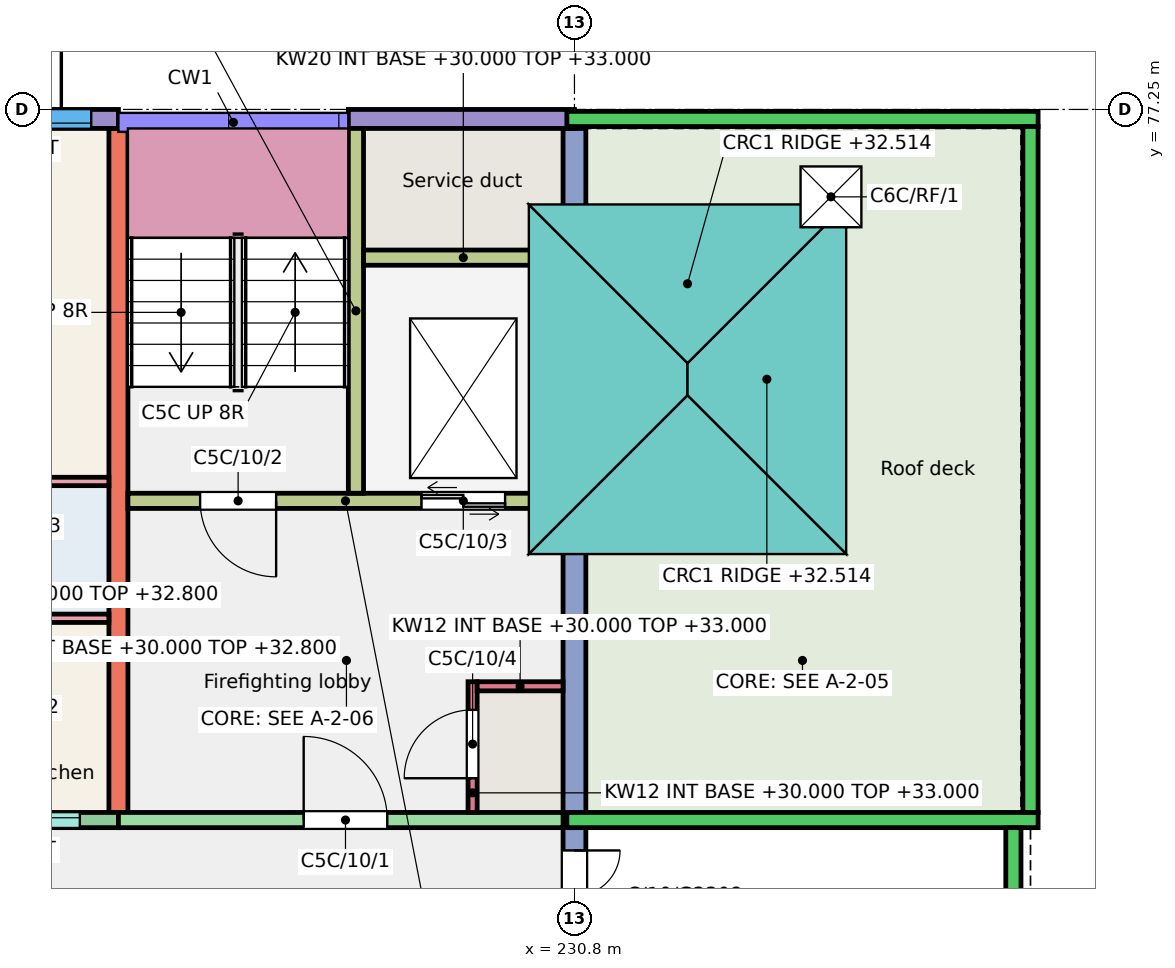
"""IFC4 building model, lengths in metres.
Left out: names, types, materials, properties, quantities, classifications, styles, units other than length and angle.
Written with IfcOpenShell. Run it as: python <this file> out.ifc"""

import sys

from ifc_helpers import new_model, si_unit, direction, frame, frame_2d, origin, origin_2d, place, context, subcontext, project, spatial, rectangle, extrude, element, fill, save


model = new_model("IFC4")
c1 = context("Model", 3, precision=1e-05, world=origin(), true_north=direction((0.0, 1.0)))
c2 = subcontext(c1, "Body", "Model", "MODEL_VIEW")
j1 = project(units=[si_unit("LENGTHUNIT", "METRE"), si_unit("PLANEANGLEUNIT", "RADIAN")], contexts=[c1])
p1 = place(None, origin())
s1 = spatial("IfcSite", under=j1, at=p1, CompositionType="ELEMENT")
p2 = place(p1, origin())
s2 = spatial("IfcBuilding", under=s1, at=p2, CompositionType="ELEMENT")
p3 = place(p2, frame((0.0, 0.0, 30.0)))
s3 = spatial("IfcBuildingStorey", under=s2, at=p3, CompositionType="ELEMENT", Elevation=30.0)
p4 = place(p3, frame((224.8, 68.0, 0.0), z_axis=(0.0, 0.0, 1.0), x_axis=(0.0, 1.0, 0.0)))
e1 = element("IfcWall", 1, at=p4, inside=s3, PredefinedType="SHEAR", context=c2, shape_type="SweptSolid", body=[
    extrude(rectangle(XDim=9.0, YDim=0.25, at=frame_2d((4.5, 0.0))), origin(), (0.0, 0.0, 1.0), 3.0),
])
p5 = place(p3, frame((230.8, 66.0, 0.0), z_axis=(0.0, 0.0, 1.0), x_axis=(0.0, 1.0, 0.0)))
e2 = element("IfcWall", 2, at=p5, inside=s3, PredefinedType="SHEAR", context=c2, shape_type="SweptSolid", body=[
    extrude(rectangle(XDim=11.0, YDim=0.3, at=frame_2d((5.5, 0.0))), origin(), (0.0, 0.0, 1.0), 3.0),
])
p6 = place(p5, frame((0.3, 0.0, 0.0)))
e3 = element("IfcOpeningElement", 3, at=p6, cuts=e2, PredefinedType="OPENING", context=c2, shape_type="SweptSolid", body=[
    extrude(rectangle(XDim=1.2, YDim=2.1, at=frame_2d((0.6, 1.05))), frame((0.0, 0.16, 0.0), z_axis=(0.0, -1.0, 0.0), x_axis=(1.0, 0.0, 0.0)), (0.0, 0.0, 1.0), 0.32),
])
p7 = place(p3, frame((221.2, 77.125, 0.0), z_axis=(0.0, 0.0, 1.0), x_axis=(1.0, 0.0, 0.0)))
e4 = element("IfcWall", 4, at=p7, inside=s3, PredefinedType="SOLIDWALL", context=c2, shape_type="SweptSolid", body=[
    extrude(rectangle(XDim=3.6, YDim=0.25, at=frame_2d((1.8, 0.0))), origin(), (0.0, 0.0, 1.0), 3.0),
])
p8 = place(p7, frame((1.742, 0.0, 0.9)))
e5 = element("IfcOpeningElement", 5, at=p8, cuts=e4, PredefinedType="OPENING", context=c2, shape_type="SweptSolid", body=[
    extrude(rectangle(XDim=1.5, YDim=1.5, at=frame_2d((0.75, 0.75))), frame((0.0, 0.135, 0.0), z_axis=(0.0, -1.0, 0.0), x_axis=(1.0, 0.0, 0.0)), (0.0, 0.0, 1.0), 0.27),
])
p9 = place(p7, frame((0.409, 0.0, 0.0)))
e6 = element("IfcOpeningElement", 6, at=p9, cuts=e4, PredefinedType="OPENING", context=c2, shape_type="SweptSolid", body=[
    extrude(rectangle(XDim=1.0, YDim=2.1, at=frame_2d((0.5, 1.05))), frame((0.0, 0.135, 0.0), z_axis=(0.0, -1.0, 0.0), x_axis=(1.0, 0.0, 0.0)), (0.0, 0.0, 1.0), 0.27),
])
p10 = place(p3, frame((221.2, 67.9, 0.0), z_axis=(0.0, 0.0, 1.0), x_axis=(1.0, 0.0, 0.0)))
e7 = element("IfcWall", 7, at=p10, inside=s3, PredefinedType="SOLIDWALL", context=c2, shape_type="SweptSolid", body=[
    extrude(rectangle(XDim=3.6, YDim=0.2, at=frame_2d((1.8, 0.0))), origin(), (0.0, 0.0, 1.0), 3.0),
])
p11 = place(p10, frame((1.893, 0.0, 1.1)))
e8 = element("IfcOpeningElement", 8, at=p11, cuts=e7, PredefinedType="OPENING", context=c2, shape_type="SweptSolid", body=[
    extrude(rectangle(XDim=1.2, YDim=1.3, at=frame_2d((0.6, 0.65))), frame((0.0, 0.11, 0.0), z_axis=(0.0, -1.0, 0.0), x_axis=(1.0, 0.0, 0.0)), (0.0, 0.0, 1.0), 0.22),
])
p12 = place(p10, frame((0.25, 0.0, 0.0)))
e9 = element("IfcOpeningElement", 9, at=p12, cuts=e7, PredefinedType="OPENING", context=c2, shape_type="SweptSolid", body=[
    extrude(rectangle(XDim=1.0, YDim=2.1, at=frame_2d((0.5, 1.05))), frame((0.0, 0.11, 0.0), z_axis=(0.0, -1.0, 0.0), x_axis=(1.0, 0.0, 0.0)), (0.0, 0.0, 1.0), 0.22),
])
p13 = place(p3, frame((227.825, 77.125, 0.0), z_axis=(0.0, 0.0, 1.0), x_axis=(1.0, 0.0, 0.0)))
e10 = element("IfcWall", 10, at=p13, inside=s3, PredefinedType="SOLIDWALL", context=c2, shape_type="SweptSolid", body=[
    extrude(rectangle(XDim=2.975, YDim=0.25, at=frame_2d((1.488, 0.0))), origin(), (0.0, 0.0, 1.0), 3.0),
])
p14 = place(p3, frame((224.8, 67.9, 0.0), z_axis=(0.0, 0.0, 1.0), x_axis=(1.0, 0.0, 0.0)))
e11 = element("IfcWall", 11, at=p14, inside=s3, PredefinedType="SHEAR", context=c2, shape_type="SweptSolid", body=[
    extrude(rectangle(XDim=5.85, YDim=0.2, at=frame_2d((2.925, 0.0))), origin(), (0.0, 0.0, 1.0), 3.0),
])
p15 = place(p14, frame((2.438, 0.0, 0.0)))
e12 = element("IfcOpeningElement", 12, at=p15, cuts=e11, PredefinedType="OPENING", context=c2, shape_type="SweptSolid", body=[
    extrude(rectangle(XDim=1.1, YDim=2.1, at=frame_2d((0.55, 1.05))), frame((0.0, 0.11, 0.0), z_axis=(0.0, -1.0, 0.0), x_axis=(1.0, 0.0, 0.0)), (0.0, 0.0, 1.0), 0.22),
])
p16 = place(p3, frame((224.925, 72.1, 0.0), z_axis=(0.0, 0.0, 1.0), x_axis=(1.0, 0.0, 0.0)))
e13 = element("IfcWall", 13, at=p16, inside=s3, PredefinedType="SHEAR", context=c2, shape_type="SweptSolid", body=[
    extrude(rectangle(XDim=5.725, YDim=0.2, at=frame_2d((2.862, 0.0))), origin(), (0.0, 0.0, 1.0), 3.0),
])
p17 = place(p16, frame((0.95, 0.0, 0.0)))
e14 = element("IfcOpeningElement", 14, at=p17, cuts=e13, PredefinedType="OPENING", context=c2, shape_type="SweptSolid", body=[
    extrude(rectangle(XDim=1.0, YDim=2.1, at=frame_2d((0.5, 1.05))), frame((0.0, 0.11, 0.0), z_axis=(0.0, -1.0, 0.0), x_axis=(1.0, 0.0, 0.0)), (0.0, 0.0, 1.0), 0.22),
])
p18 = place(p16, frame((3.863, 0.0, 0.0)))
e15 = element("IfcOpeningElement", 15, at=p18, cuts=e13, PredefinedType="OPENING", context=c2, shape_type="SweptSolid", body=[
    extrude(rectangle(XDim=1.1, YDim=2.1, at=frame_2d((0.55, 1.05))), frame((0.0, 0.11, 0.0), z_axis=(0.0, -1.0, 0.0), x_axis=(1.0, 0.0, 0.0)), (0.0, 0.0, 1.0), 0.22),
])
p19 = place(p3, frame((227.925, 72.2, 0.0), z_axis=(0.0, 0.0, 1.0), x_axis=(0.0, 1.0, 0.0)))
e16 = element("IfcWall", 16, at=p19, inside=s3, PredefinedType="SHEAR", context=c2, shape_type="SweptSolid", body=[
    extrude(rectangle(XDim=4.8, YDim=0.2, at=frame_2d((2.4, 0.0))), origin(), (0.0, 0.0, 1.0), 3.0),
])
p20 = place(p3, frame((228.025, 75.3, 0.0), z_axis=(0.0, 0.0, 1.0), x_axis=(1.0, 0.0, 0.0)))
e17 = element("IfcWall", 17, at=p20, inside=s3, PredefinedType="SHEAR", context=c2, shape_type="SweptSolid", body=[
    extrude(rectangle(XDim=2.625, YDim=0.2, at=frame_2d((1.312, 0.0))), origin(), (0.0, 0.0, 1.0), 3.0),
])
p21 = place(p3, frame((229.46, 68.0, 0.0), z_axis=(0.0, 0.0, 1.0), x_axis=(0.0, 1.0, 0.0)))
e18 = element("IfcWall", 18, at=p21, inside=s3, PredefinedType="SHEAR", context=c2, shape_type="SweptSolid", body=[
    extrude(rectangle(XDim=1.72, YDim=0.12, at=frame_2d((0.86, 0.0))), origin(), (0.0, 0.0, 1.0), 3.0),
])
p22 = place(p21, frame((0.45, 0.0, 0.0)))
e19 = element("IfcOpeningElement", 19, at=p22, cuts=e18, PredefinedType="OPENING", context=c2, shape_type="SweptSolid", body=[
    extrude(rectangle(XDim=0.9, YDim=2.1, at=frame_2d((0.45, 1.05))), frame((0.0, 0.07, 0.0), z_axis=(0.0, -1.0, 0.0), x_axis=(1.0, 0.0, 0.0)), (0.0, 0.0, 1.0), 0.14),
])
p23 = place(p3, frame((229.52, 69.66, 0.0), z_axis=(0.0, 0.0, 1.0), x_axis=(1.0, 0.0, 0.0)))
e20 = element("IfcWall", 20, at=p23, inside=s3, PredefinedType="SHEAR", context=c2, shape_type="SweptSolid", body=[
    extrude(rectangle(XDim=1.13, YDim=0.12, at=frame_2d((0.565, 0.0))), origin(), (0.0, 0.0, 1.0), 3.0),
])
for number, where, z_axis, x_axis in (
    (21, (230.95, 72.1, 0.0), (0.0, 0.0, 1.0), (1.0, 0.0, 0.0)),
    (22, (230.95, 75.3, 0.0), (0.0, 0.0, 1.0), (1.0, 0.0, 0.0)),
):
    element("IfcWall", number, at=place(p3, frame(where, z_axis=z_axis, x_axis=x_axis)), inside=s3, PredefinedType="SHEAR", context=c2, shape_type="SweptSolid", body=[
        extrude(rectangle(XDim=2.825, YDim=0.2, at=frame_2d((1.413, 0.0))), origin(), (0.0, 0.0, 1.0), 1.5),
    ])
p24 = place(p3, frame((233.675, 72.2, 0.0), z_axis=(0.0, 0.0, 1.0), x_axis=(0.0, 1.0, 0.0)))
e23 = element("IfcWall", 23, at=p24, inside=s3, PredefinedType="SHEAR", context=c2, shape_type="SweptSolid", body=[
    extrude(rectangle(XDim=3.0, YDim=0.2, at=frame_2d((1.5, 0.0))), origin(), (0.0, 0.0, 1.0), 1.5),
])
for number, where, z_axis, x_axis in (
    (24, (230.7, 77.125, 0.0), (0.0, 0.0, 1.0), (1.0, 0.0, 0.0)),
    (25, (230.7, 67.9, 0.0), (0.0, 0.0, 1.0), (1.0, 0.0, 0.0)),
):
    element("IfcWall", number, at=place(p3, frame(where, z_axis=z_axis, x_axis=x_axis)), inside=s3, PredefinedType="PARAPET", context=c2, shape_type="SweptSolid", body=[
        extrude(rectangle(XDim=6.2, YDim=0.2, at=frame_2d((3.1, 0.0))), origin(), (0.0, 0.0, 1.0), 1.1),
    ])
p25 = place(p3, frame((236.8, 68.0, 0.0), z_axis=(0.0, 0.0, 1.0), x_axis=(0.0, 1.0, 0.0)))
e26 = element("IfcWall", 26, at=p25, inside=s3, PredefinedType="PARAPET", context=c2, shape_type="SweptSolid", body=[
    extrude(rectangle(XDim=9.025, YDim=0.2, at=frame_2d((4.512, 0.0))), origin(), (0.0, 0.0, 1.0), 1.1),
])
p26 = place(p3, frame((236.575, 66.225, 0.0), z_axis=(0.0, 0.0, 1.0), x_axis=(0.0, 1.0, 0.0)))
e27 = element("IfcWall", 27, at=p26, inside=s3, PredefinedType="PARAPET", context=c2, shape_type="SweptSolid", body=[
    extrude(rectangle(XDim=1.575, YDim=0.2, at=frame_2d((0.788, 0.0))), origin(), (0.0, 0.0, 1.0), 1.1),
])
p27 = place(p3, frame((222.71, 70.555, 0.0), z_axis=(0.0, 0.0, 1.0), x_axis=(1.0, 0.0, 0.0)))
e28 = element("IfcWall", 28, at=p27, inside=s3, PredefinedType="PARTITIONING", context=c2, shape_type="SweptSolid", body=[
    extrude(rectangle(XDim=1.965, YDim=0.11, at=frame_2d((0.982, 0.0))), origin(), (0.0, 0.0, 1.0), 2.8),
])
p28 = place(p3, frame((221.3, 72.355, 0.0), z_axis=(0.0, 0.0, 1.0), x_axis=(1.0, 0.0, 0.0)))
e29 = element("IfcWall", 29, at=p28, inside=s3, PredefinedType="PARTITIONING", context=c2, shape_type="SweptSolid", body=[
    extrude(rectangle(XDim=3.375, YDim=0.11, at=frame_2d((1.688, 0.0))), origin(), (0.0, 0.0, 1.0), 2.8),
])
p29 = place(p28, frame((0.2, 0.0, 0.0)))
e30 = element("IfcOpeningElement", 30, at=p29, cuts=e29, PredefinedType="OPENING", context=c2, shape_type="SweptSolid", body=[
    extrude(rectangle(XDim=0.9, YDim=2.1, at=frame_2d((0.45, 1.05))), frame((0.0, 0.065, 0.0), z_axis=(0.0, -1.0, 0.0), x_axis=(1.0, 0.0, 0.0)), (0.0, 0.0, 1.0), 0.13),
])
p30 = place(p3, frame((0.0, 0.0, -0.25)))
p31 = place(p30, frame((234.175, 76.1, 0.0)))
p32 = place(p31, frame((0.0, 0.0, 0.2)))
e31 = element("IfcDoor", 31, at=p32, inside=s3, OperationType="SINGLE_SWING_LEFT", PredefinedType="TRAPDOOR", context=c2, shape_type="SweptSolid", body=[
    extrude(rectangle(XDim=0.8, YDim=0.8, at=origin_2d()), origin(), (0.0, 0.0, 1.0), 0.05),
])
p33 = place(p11, origin())
e32 = element("IfcWindow", 32, at=p33, inside=s3, PartitioningType="SINGLE_PANEL", PredefinedType="WINDOW", context=c2, shape_type="SweptSolid", body=[
    extrude(rectangle(XDim=1.2, YDim=1.3, at=frame_2d((0.6, 0.65))), frame((0.0, 0.06, 0.0), z_axis=(0.0, -1.0, 0.0), x_axis=(1.0, 0.0, 0.0)), (0.0, 0.0, 1.0), 0.06),
])
fill(e8, e32)
p34 = place(p8, origin())
e33 = element("IfcWindow", 33, at=p34, inside=s3, PartitioningType="SINGLE_PANEL", PredefinedType="WINDOW", context=c2, shape_type="SweptSolid", body=[
    extrude(rectangle(XDim=1.5, YDim=1.5, at=frame_2d((0.75, 0.75))), frame((0.0, -0.025, 0.0), z_axis=(0.0, -1.0, 0.0), x_axis=(1.0, 0.0, 0.0)), (0.0, 0.0, 1.0), 0.06),
])
fill(e5, e33)
p35 = place(p15, origin())
e34 = element("IfcDoor", 34, at=p35, inside=s3, OperationType="SINGLE_SWING_LEFT", PredefinedType="DOOR", context=c2, shape_type="SweptSolid", body=[
    extrude(rectangle(XDim=1.1, YDim=2.1, at=frame_2d((0.55, 1.05))), frame((0.0, 0.025, 0.0), z_axis=(0.0, -1.0, 0.0), x_axis=(1.0, 0.0, 0.0)), (0.0, 0.0, 1.0), 0.05),
])
fill(e12, e34)
p36 = place(p17, origin())
e35 = element("IfcDoor", 35, at=p36, inside=s3, OperationType="SINGLE_SWING_RIGHT", PredefinedType="DOOR", context=c2, shape_type="SweptSolid", body=[
    extrude(rectangle(XDim=1.0, YDim=2.1, at=frame_2d((0.5, 1.05))), frame((0.0, 0.025, 0.0), z_axis=(0.0, -1.0, 0.0), x_axis=(1.0, 0.0, 0.0)), (0.0, 0.0, 1.0), 0.05),
])
fill(e14, e35)
p37 = place(p18, origin())
e36 = element("IfcDoor", 36, at=p37, inside=s3, OperationType="DOUBLE_DOOR_SLIDING", PredefinedType="DOOR", context=c2, shape_type="SweptSolid", body=[
    extrude(rectangle(XDim=1.1, YDim=2.1, at=frame_2d((0.55, 1.05))), frame((0.0, 0.025, 0.0), z_axis=(0.0, -1.0, 0.0), x_axis=(1.0, 0.0, 0.0)), (0.0, 0.0, 1.0), 0.05),
])
fill(e15, e36)
p38 = place(p22, origin())
e37 = element("IfcDoor", 37, at=p38, inside=s3, OperationType="SINGLE_SWING_LEFT", PredefinedType="DOOR", context=c2, shape_type="SweptSolid", body=[
    extrude(rectangle(XDim=0.9, YDim=2.1, at=frame_2d((0.45, 1.05))), frame((0.0, 0.025, 0.0), z_axis=(0.0, -1.0, 0.0), x_axis=(1.0, 0.0, 0.0)), (0.0, 0.0, 1.0), 0.05),
])
fill(e19, e37)
p39 = place(p6, origin())
e38 = element("IfcDoor", 38, at=p39, inside=s3, OperationType="DOUBLE_DOOR_SINGLE_SWING", PredefinedType="DOOR", context=c2, shape_type="SweptSolid", body=[
    extrude(rectangle(XDim=1.2, YDim=2.1, at=frame_2d((0.6, 1.05))), frame((0.0, 0.025, 0.0), z_axis=(0.0, -1.0, 0.0), x_axis=(1.0, 0.0, 0.0)), (0.0, 0.0, 1.0), 0.05),
])
fill(e3, e38)
save(model, sys.argv[1])
